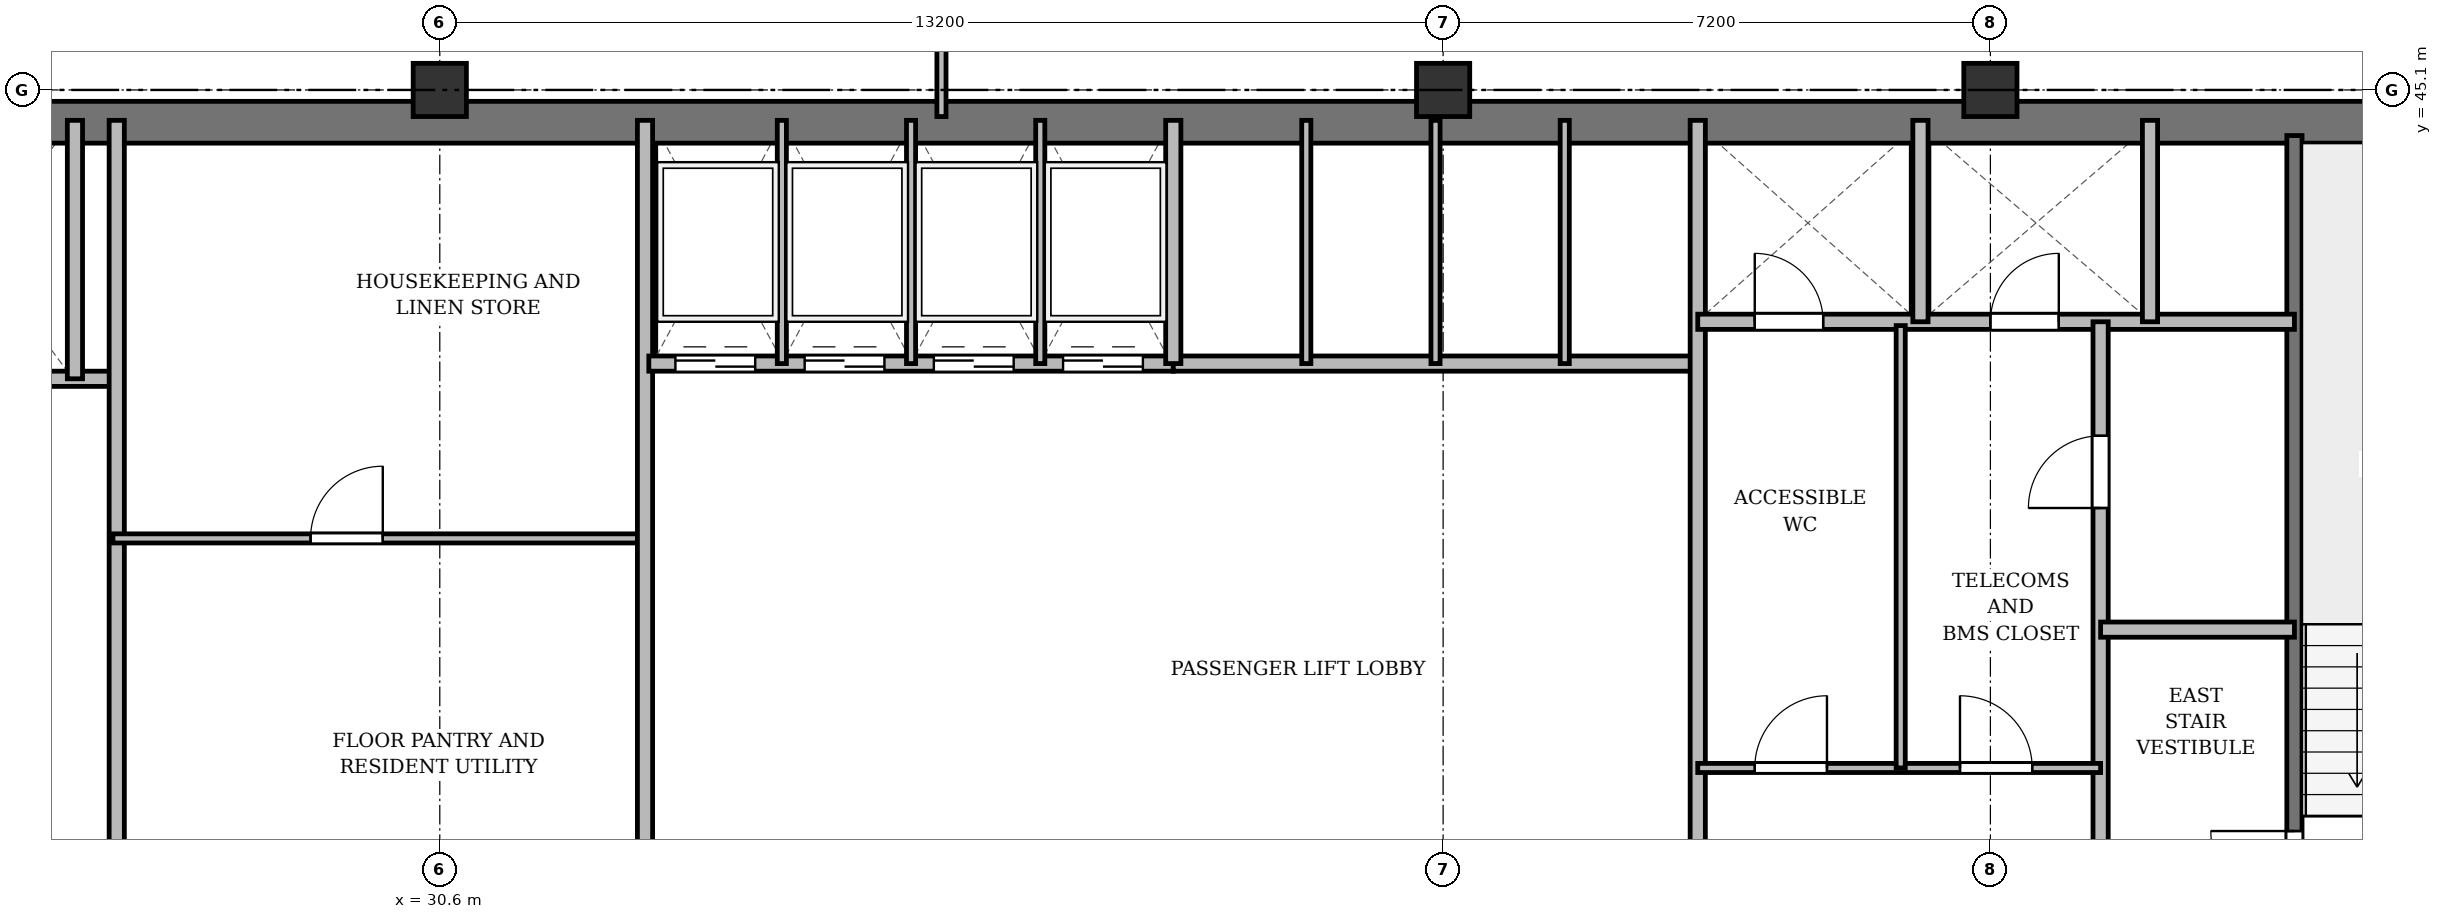
"""IFC4 building model, lengths in metres.
Left out: names, types, materials, properties, quantities, classifications, styles, units other than length and angle.
Written with IfcOpenShell. Run it as: python <this file> out.ifc"""

import sys

from ifc_helpers import new_model, si_unit, direction, frame, frame_2d, origin, origin_2d, place, context, subcontext, project, spatial, rectangle, extrude, source, transform, mapped, element, fill, save


model = new_model("IFC4")
c1 = context("Model", 3, precision=1e-05, world=origin(), true_north=direction((0.0, 1.0)))
c2 = subcontext(c1, "Body", "Model", "MODEL_VIEW")
j1 = project(units=[si_unit("LENGTHUNIT", "METRE"), si_unit("PLANEANGLEUNIT", "RADIAN")], contexts=[c1])
p1 = place(None, origin())
s1 = spatial("IfcSite", under=j1, at=p1, CompositionType="ELEMENT")
p2 = place(p1, origin())
s2 = spatial("IfcBuilding", under=s1, at=p2, CompositionType="ELEMENT")
p3 = place(p2, frame((0.0, 0.0, 208.5)))
s3 = spatial("IfcBuildingStorey", under=s2, at=p3, CompositionType="ELEMENT", Elevation=208.5)
m1 = source(origin(), c2, "Body", "SweptSolid", [
    extrude(rectangle(XDim=0.7, YDim=0.7, at=origin_2d()), origin(), (0.0, 0.0, 1.0), 3.6),
])
for number, where, z_axis, x_axis in (
    (1, (30.6, 45.1, 0.0), (0.0, 0.0, 1.0), (1.0, 0.0, 0.0)),
    (2, (43.8, 45.1, 0.0), (0.0, 0.0, 1.0), (1.0, 0.0, 0.0)),
    (3, (51.0, 45.1, 0.0), (0.0, 0.0, 1.0), (1.0, 0.0, 0.0)),
):
    element("IfcColumn", number, at=place(p3, frame(where, z_axis=z_axis, x_axis=x_axis)), inside=s3, PredefinedType="COLUMN", context=c2, shape_type="MappedRepresentation", body=[
        mapped(m1, transform((0.0, 0.0, 0.0), x_axis=(1.0, 0.0, 0.0), y_axis=(0.0, 1.0, 0.0), z_axis=(0.0, 0.0, 1.0), scale=1.0)),
    ])
p4 = place(p3, frame((15.65, 44.675, 0.0), z_axis=(0.0, 0.0, 1.0), x_axis=(1.0, 0.0, 0.0)))
e4 = element("IfcWall", 4, at=p4, inside=s3, PredefinedType="SHEAR", context=c2, shape_type="SweptSolid", body=[
    extrude(rectangle(XDim=43.1, YDim=0.55, at=frame_2d((21.55, 0.0))), origin(), (0.0, 0.0, 1.0), 3.36),
])
p5 = place(p3, frame((55.0, 33.4, 0.0), z_axis=(0.0, 0.0, 1.0), x_axis=(0.0, 1.0, 0.0)))
e5 = element("IfcWall", 5, at=p5, inside=s3, PredefinedType="SHEAR", context=c2, shape_type="SweptSolid", body=[
    extrude(rectangle(XDim=11.1, YDim=0.2, at=frame_2d((5.55, 0.0))), origin(), (0.0, 0.0, 1.0), 3.36),
])
p6 = place(p5, frame((0.85, 0.0, 0.0)))
e6 = element("IfcOpeningElement", 6, at=p6, cuts=e5, PredefinedType="OPENING", context=c2, shape_type="SweptSolid", body=[
    extrude(rectangle(XDim=1.1, YDim=2.15, at=frame_2d((0.55, 1.075))), frame((0.0, 0.11, 0.0), z_axis=(0.0, -1.0, 0.0), x_axis=(1.0, 0.0, 0.0)), (0.0, 0.0, 1.0), 0.22),
])
p7 = place(p3, frame((19.55, 41.3, 0.0), z_axis=(0.0, 0.0, 1.0), x_axis=(1.0, 0.0, 0.0)))
e7 = element("IfcWall", 7, at=p7, inside=s3, PredefinedType="SOLIDWALL", context=c2, shape_type="SweptSolid", body=[
    extrude(rectangle(XDim=6.75, YDim=0.2, at=frame_2d((3.375, 0.0))), origin(), (0.0, 0.0, 1.0), 3.36),
])
p8 = place(p7, frame((1.7, 0.0, 0.0)))
e8 = element("IfcOpeningElement", 8, at=p8, cuts=e7, PredefinedType="OPENING", context=c2, shape_type="SweptSolid", body=[
    extrude(rectangle(XDim=1.1, YDim=2.15, at=frame_2d((0.55, 1.075))), frame((0.0, 0.11, 0.0), z_axis=(0.0, -1.0, 0.0), x_axis=(1.0, 0.0, 0.0)), (0.0, 0.0, 1.0), 0.22),
])
p9 = place(p7, frame((4.4, 0.0, 0.0)))
e9 = element("IfcOpeningElement", 9, at=p9, cuts=e7, PredefinedType="OPENING", context=c2, shape_type="SweptSolid", body=[
    extrude(rectangle(XDim=1.1, YDim=2.15, at=frame_2d((0.55, 1.075))), frame((0.0, 0.11, 0.0), z_axis=(0.0, -1.0, 0.0), x_axis=(1.0, 0.0, 0.0)), (0.0, 0.0, 1.0), 0.22),
])
p10 = place(p3, frame((25.8, 41.3, 0.0), z_axis=(0.0, 0.0, 1.0), x_axis=(0.0, 1.0, 0.0)))
e10 = element("IfcWall", 10, at=p10, inside=s3, PredefinedType="SOLIDWALL", context=c2, shape_type="SweptSolid", body=[
    extrude(rectangle(XDim=3.4, YDim=0.2, at=frame_2d((1.7, 0.0))), origin(), (0.0, 0.0, 1.0), 3.36),
])
p11 = place(p3, frame((26.35, 33.4, 0.0), z_axis=(0.0, 0.0, 1.0), x_axis=(0.0, 1.0, 0.0)))
e11 = element("IfcWall", 11, at=p11, inside=s3, PredefinedType="SOLIDWALL", context=c2, shape_type="SweptSolid", body=[
    extrude(rectangle(XDim=11.3, YDim=0.2, at=frame_2d((5.65, 0.0))), origin(), (0.0, 0.0, 1.0), 2.91),
])
p12 = place(p3, frame((26.3, 39.2, 0.0), z_axis=(0.0, 0.0, 1.0), x_axis=(1.0, 0.0, 0.0)))
e12 = element("IfcWall", 12, at=p12, inside=s3, PredefinedType="PARTITIONING", context=c2, shape_type="SweptSolid", body=[
    extrude(rectangle(XDim=7.0, YDim=0.12, at=frame_2d((3.5, 0.0))), origin(), (0.0, 0.0, 1.0), 2.86),
])
p13 = place(p12, frame((2.6, 0.0, 0.0)))
e13 = element("IfcOpeningElement", 13, at=p13, cuts=e12, PredefinedType="OPENING", context=c2, shape_type="SweptSolid", body=[
    extrude(rectangle(XDim=0.95, YDim=2.15, at=frame_2d((0.475, 1.075))), frame((0.0, 0.07, 0.0), z_axis=(0.0, -1.0, 0.0), x_axis=(1.0, 0.0, 0.0)), (0.0, 0.0, 1.0), 0.14),
])
p14 = place(p3, frame((33.3, 33.4, 0.0), z_axis=(0.0, 0.0, 1.0), x_axis=(0.0, 1.0, 0.0)))
e14 = element("IfcWall", 14, at=p14, inside=s3, PredefinedType="SOLIDWALL", context=c2, shape_type="SweptSolid", body=[
    extrude(rectangle(XDim=11.3, YDim=0.2, at=frame_2d((5.65, 0.0))), origin(), (0.0, 0.0, 1.0), 2.91),
])
p15 = place(p3, frame((33.35, 41.5, 0.0), z_axis=(0.0, 0.0, 1.0), x_axis=(1.0, 0.0, 0.0)))
e15 = element("IfcWall", 15, at=p15, inside=s3, PredefinedType="SOLIDWALL", context=c2, shape_type="SweptSolid", body=[
    extrude(rectangle(XDim=6.9, YDim=0.2, at=frame_2d((3.45, 0.0))), origin(), (0.0, 0.0, 1.0), 3.36),
])
p16 = place(p15, frame((0.35, 0.0, 0.0)))
e16 = element("IfcOpeningElement", 16, at=p16, cuts=e15, PredefinedType="OPENING", context=c2, shape_type="SweptSolid", body=[
    extrude(rectangle(XDim=1.05, YDim=2.15, at=frame_2d((0.525, 1.075))), frame((0.0, 0.11, 0.0), z_axis=(0.0, -1.0, 0.0), x_axis=(1.0, 0.0, 0.0)), (0.0, 0.0, 1.0), 0.22),
])
p17 = place(p15, frame((2.05, 0.0, 0.0)))
e17 = element("IfcOpeningElement", 17, at=p17, cuts=e15, PredefinedType="OPENING", context=c2, shape_type="SweptSolid", body=[
    extrude(rectangle(XDim=1.05, YDim=2.15, at=frame_2d((0.525, 1.075))), frame((0.0, 0.11, 0.0), z_axis=(0.0, -1.0, 0.0), x_axis=(1.0, 0.0, 0.0)), (0.0, 0.0, 1.0), 0.22),
])
p18 = place(p15, frame((3.75, 0.0, 0.0)))
e18 = element("IfcOpeningElement", 18, at=p18, cuts=e15, PredefinedType="OPENING", context=c2, shape_type="SweptSolid", body=[
    extrude(rectangle(XDim=1.05, YDim=2.15, at=frame_2d((0.525, 1.075))), frame((0.0, 0.11, 0.0), z_axis=(0.0, -1.0, 0.0), x_axis=(1.0, 0.0, 0.0)), (0.0, 0.0, 1.0), 0.22),
])
p19 = place(p15, frame((5.45, 0.0, 0.0)))
e19 = element("IfcOpeningElement", 19, at=p19, cuts=e15, PredefinedType="OPENING", context=c2, shape_type="SweptSolid", body=[
    extrude(rectangle(XDim=1.05, YDim=2.15, at=frame_2d((0.525, 1.075))), frame((0.0, 0.11, 0.0), z_axis=(0.0, -1.0, 0.0), x_axis=(1.0, 0.0, 0.0)), (0.0, 0.0, 1.0), 0.22),
])
for number, where, z_axis, x_axis in (
    (20, (35.1, 41.5, 0.0), (0.0, 0.0, 1.0), (0.0, 1.0, 0.0)),
    (21, (36.8, 41.5, 0.0), (0.0, 0.0, 1.0), (0.0, 1.0, 0.0)),
    (22, (38.5, 41.5, 0.0), (0.0, 0.0, 1.0), (0.0, 1.0, 0.0)),
):
    element("IfcWall", number, at=place(p3, frame(where, z_axis=z_axis, x_axis=x_axis)), inside=s3, PredefinedType="PARTITIONING", context=c2, shape_type="SweptSolid", body=[
        extrude(rectangle(XDim=3.2, YDim=0.12, at=frame_2d((1.6, 0.0))), origin(), (0.0, 0.0, 1.0), 3.36),
    ])
p20 = place(p3, frame((40.25, 41.5, 0.0), z_axis=(0.0, 0.0, 1.0), x_axis=(1.0, 0.0, 0.0)))
e23 = element("IfcWall", 23, at=p20, inside=s3, PredefinedType="SOLIDWALL", context=c2, shape_type="SweptSolid", body=[
    extrude(rectangle(XDim=6.9, YDim=0.2, at=frame_2d((3.45, 0.0))), origin(), (0.0, 0.0, 1.0), 2.86),
])
p21 = place(p3, frame((40.25, 41.5, 0.0), z_axis=(0.0, 0.0, 1.0), x_axis=(0.0, 1.0, 0.0)))
e24 = element("IfcWall", 24, at=p21, inside=s3, PredefinedType="SOLIDWALL", context=c2, shape_type="SweptSolid", body=[
    extrude(rectangle(XDim=3.2, YDim=0.2, at=frame_2d((1.6, 0.0))), origin(), (0.0, 0.0, 1.0), 3.36),
])
p22 = place(p3, frame((42.0, 41.5, 0.0), z_axis=(0.0, 0.0, 1.0), x_axis=(0.0, 1.0, 0.0)))
e25 = element("IfcWall", 25, at=p22, inside=s3, PredefinedType="PARTITIONING", context=c2, shape_type="SweptSolid", body=[
    extrude(rectangle(XDim=3.2, YDim=0.12, at=frame_2d((1.6, 0.0))), origin(), (0.0, 0.0, 1.0), 3.36),
])
p23 = place(p3, frame((43.7, 41.5, 0.0), z_axis=(0.0, 0.0, 1.0), x_axis=(0.0, 1.0, 0.0)))
e26 = element("IfcWall", 26, at=p23, inside=s3, PredefinedType="PARTITIONING", context=c2, shape_type="SweptSolid", body=[
    extrude(rectangle(XDim=3.2, YDim=0.12, at=frame_2d((1.6, 0.0))), origin(), (0.0, 0.0, 1.0), 2.86),
])
p24 = place(p3, frame((45.4, 41.5, 0.0), z_axis=(0.0, 0.0, 1.0), x_axis=(0.0, 1.0, 0.0)))
e27 = element("IfcWall", 27, at=p24, inside=s3, PredefinedType="PARTITIONING", context=c2, shape_type="SweptSolid", body=[
    extrude(rectangle(XDim=3.2, YDim=0.12, at=frame_2d((1.6, 0.0))), origin(), (0.0, 0.0, 1.0), 3.36),
])
p25 = place(p3, frame((47.15, 33.4, 0.0), z_axis=(0.0, 0.0, 1.0), x_axis=(0.0, 1.0, 0.0)))
e28 = element("IfcWall", 28, at=p25, inside=s3, PredefinedType="SOLIDWALL", context=c2, shape_type="SweptSolid", body=[
    extrude(rectangle(XDim=11.3, YDim=0.2, at=frame_2d((5.65, 0.0))), origin(), (0.0, 0.0, 1.0), 2.91),
])
p26 = place(p3, frame((47.15, 42.05, 0.0), z_axis=(0.0, 0.0, 1.0), x_axis=(1.0, 0.0, 0.0)))
e29 = element("IfcWall", 29, at=p26, inside=s3, PredefinedType="SOLIDWALL", context=c2, shape_type="SweptSolid", body=[
    extrude(rectangle(XDim=7.85, YDim=0.2, at=frame_2d((3.925, 0.0))), origin(), (0.0, 0.0, 1.0), 2.86),
])
p27 = place(p26, frame((0.75, 0.0, 0.0)))
e30 = element("IfcOpeningElement", 30, at=p27, cuts=e29, PredefinedType="OPENING", context=c2, shape_type="SweptSolid", body=[
    extrude(rectangle(XDim=0.9, YDim=2.1, at=frame_2d((0.45, 1.05))), frame((0.0, 0.11, 0.0), z_axis=(0.0, -1.0, 0.0), x_axis=(1.0, 0.0, 0.0)), (0.0, 0.0, 1.0), 0.22),
])
p28 = place(p26, frame((3.85, 0.0, 0.0)))
e31 = element("IfcOpeningElement", 31, at=p28, cuts=e29, PredefinedType="OPENING", context=c2, shape_type="SweptSolid", body=[
    extrude(rectangle(XDim=0.9, YDim=2.1, at=frame_2d((0.45, 1.05))), frame((0.0, 0.11, 0.0), z_axis=(0.0, -1.0, 0.0), x_axis=(1.0, 0.0, 0.0)), (0.0, 0.0, 1.0), 0.22),
])
for number, where, z_axis, x_axis in (
    (32, (50.08, 42.05, 0.0), (0.0, 0.0, 1.0), (0.0, 1.0, 0.0)),
    (33, (53.1, 42.05, 0.0), (0.0, 0.0, 1.0), (0.0, 1.0, 0.0)),
):
    element("IfcWall", number, at=place(p3, frame(where, z_axis=z_axis, x_axis=x_axis)), inside=s3, PredefinedType="SOLIDWALL", context=c2, shape_type="SweptSolid", body=[
        extrude(rectangle(XDim=2.65, YDim=0.2, at=frame_2d((1.325, 0.0))), origin(), (0.0, 0.0, 1.0), 3.36),
    ])
p29 = place(p3, frame((52.45, 33.4, 0.0), z_axis=(0.0, 0.0, 1.0), x_axis=(0.0, 1.0, 0.0)))
e34 = element("IfcWall", 34, at=p29, inside=s3, PredefinedType="PARTITIONING", context=c2, shape_type="SweptSolid", body=[
    extrude(rectangle(XDim=8.65, YDim=0.2, at=frame_2d((4.325, 0.0))), origin(), (0.0, 0.0, 1.0), 2.91),
])
p30 = place(p29, frame((6.2, 0.0, 0.0)))
e35 = element("IfcOpeningElement", 35, at=p30, cuts=e34, PredefinedType="OPENING", context=c2, shape_type="SweptSolid", body=[
    extrude(rectangle(XDim=0.95, YDim=2.15, at=frame_2d((0.475, 1.075))), frame((0.0, 0.11, 0.0), z_axis=(0.0, -1.0, 0.0), x_axis=(1.0, 0.0, 0.0)), (0.0, 0.0, 1.0), 0.22),
])
p31 = place(p3, frame((52.45, 38.0, 0.0), z_axis=(0.0, 0.0, 1.0), x_axis=(1.0, 0.0, 0.0)))
e36 = element("IfcWall", 36, at=p31, inside=s3, PredefinedType="PARTITIONING", context=c2, shape_type="SweptSolid", body=[
    extrude(rectangle(XDim=2.55, YDim=0.2, at=frame_2d((1.275, 0.0))), origin(), (0.0, 0.0, 1.0), 3.36),
])
p32 = place(p3, frame((47.15, 36.18, 0.0), z_axis=(0.0, 0.0, 1.0), x_axis=(1.0, 0.0, 0.0)))
e37 = element("IfcWall", 37, at=p32, inside=s3, PredefinedType="PARTITIONING", context=c2, shape_type="SweptSolid", body=[
    extrude(rectangle(XDim=5.3, YDim=0.12, at=frame_2d((2.65, 0.0))), origin(), (0.0, 0.0, 1.0), 2.86),
])
p33 = place(p32, frame((0.75, 0.0, 0.0)))
e38 = element("IfcOpeningElement", 38, at=p33, cuts=e37, PredefinedType="OPENING", context=c2, shape_type="SweptSolid", body=[
    extrude(rectangle(XDim=0.95, YDim=2.15, at=frame_2d((0.475, 1.075))), frame((0.0, 0.07, 0.0), z_axis=(0.0, -1.0, 0.0), x_axis=(1.0, 0.0, 0.0)), (0.0, 0.0, 1.0), 0.14),
])
p34 = place(p32, frame((3.45, 0.0, 0.0)))
e39 = element("IfcOpeningElement", 39, at=p34, cuts=e37, PredefinedType="OPENING", context=c2, shape_type="SweptSolid", body=[
    extrude(rectangle(XDim=0.95, YDim=2.15, at=frame_2d((0.475, 1.075))), frame((0.0, 0.07, 0.0), z_axis=(0.0, -1.0, 0.0), x_axis=(1.0, 0.0, 0.0)), (0.0, 0.0, 1.0), 0.14),
])
p35 = place(p3, frame((49.82, 36.18, 0.0), z_axis=(0.0, 0.0, 1.0), x_axis=(0.0, 1.0, 0.0)))
e40 = element("IfcWall", 40, at=p35, inside=s3, PredefinedType="PARTITIONING", context=c2, shape_type="SweptSolid", body=[
    extrude(rectangle(XDim=5.82, YDim=0.12, at=frame_2d((2.91, 0.0))), origin(), (0.0, 0.0, 1.0), 3.36),
])
p36 = place(p3, frame((37.2, 44.75, 0.0), z_axis=(0.0, 0.0, 1.0), x_axis=(0.0, 1.0, 0.0)))
e41 = element("IfcWall", 41, at=p36, inside=s3, PredefinedType="PARTITIONING", context=c2, shape_type="SweptSolid", body=[
    extrude(rectangle(XDim=3.61, YDim=0.12, at=frame_2d((1.805, 0.0))), origin(), (0.0, 0.0, 1.0), 2.91),
])
p37 = place(p36, frame((1.1, 0.0, 0.0)))
e42 = element("IfcOpeningElement", 42, at=p37, cuts=e41, PredefinedType="OPENING", context=c2, shape_type="SweptSolid", body=[
    extrude(rectangle(XDim=0.95, YDim=2.15, at=frame_2d((0.475, 1.075))), frame((0.0, 0.07, 0.0), z_axis=(0.0, -1.0, 0.0), x_axis=(1.0, 0.0, 0.0)), (0.0, 0.0, 1.0), 0.14),
])
m2 = source(origin(), c2, "Body", "SweptSolid", [
    extrude(rectangle(XDim=1.1, YDim=2.15, at=frame_2d((0.55, 1.075))), frame((0.0, 0.025, 0.0), z_axis=(0.0, -1.0, 0.0), x_axis=(1.0, 0.0, 0.0)), (0.0, 0.0, 1.0), 0.05),
])
p38 = place(p6, origin())
e43 = element("IfcDoor", 43, at=p38, inside=s3, OperationType="SINGLE_SWING_RIGHT", PredefinedType="DOOR", context=c2, shape_type="MappedRepresentation", body=[
    mapped(m2, transform((0.0, 0.0, 0.0), x_axis=(1.0, 0.0, 0.0), y_axis=(0.0, 1.0, 0.0), z_axis=(0.0, 0.0, 1.0), scale=1.0)),
])
fill(e6, e43)
m3 = source(origin(), c2, "Body", "SweptSolid", [
    extrude(rectangle(XDim=0.95, YDim=2.15, at=frame_2d((0.475, 1.075))), frame((0.0, 0.025, 0.0), z_axis=(0.0, -1.0, 0.0), x_axis=(1.0, 0.0, 0.0)), (0.0, 0.0, 1.0), 0.05),
])
p39 = place(p13, origin())
e44 = element("IfcDoor", 44, at=p39, inside=s3, OperationType="SINGLE_SWING_RIGHT", PredefinedType="DOOR", context=c2, shape_type="MappedRepresentation", body=[
    mapped(m3, transform((0.0, 0.0, 0.0), x_axis=(1.0, 0.0, 0.0), y_axis=(0.0, 1.0, 0.0), z_axis=(0.0, 0.0, 1.0), scale=1.0)),
])
fill(e13, e44)
m4 = source(origin(), c2, "Body", "SweptSolid", [
    extrude(rectangle(XDim=1.05, YDim=2.15, at=frame_2d((0.525, 1.075))), frame((0.0, 0.025, 0.0), z_axis=(0.0, -1.0, 0.0), x_axis=(1.0, 0.0, 0.0)), (0.0, 0.0, 1.0), 0.05),
])
p40 = place(p16, origin())
e45 = element("IfcDoor", 45, at=p40, inside=s3, OperationType="DOUBLE_DOOR_SLIDING", PredefinedType="DOOR", context=c2, shape_type="MappedRepresentation", body=[
    mapped(m4, transform((0.0, 0.0, 0.0), x_axis=(1.0, 0.0, 0.0), y_axis=(0.0, 1.0, 0.0), z_axis=(0.0, 0.0, 1.0), scale=1.0)),
])
fill(e16, e45)
p41 = place(p17, origin())
e46 = element("IfcDoor", 46, at=p41, inside=s3, OperationType="DOUBLE_DOOR_SLIDING", PredefinedType="DOOR", context=c2, shape_type="MappedRepresentation", body=[
    mapped(m4, transform((0.0, 0.0, 0.0), x_axis=(1.0, 0.0, 0.0), y_axis=(0.0, 1.0, 0.0), z_axis=(0.0, 0.0, 1.0), scale=1.0)),
])
fill(e17, e46)
p42 = place(p18, origin())
e47 = element("IfcDoor", 47, at=p42, inside=s3, OperationType="DOUBLE_DOOR_SLIDING", PredefinedType="DOOR", context=c2, shape_type="MappedRepresentation", body=[
    mapped(m4, transform((0.0, 0.0, 0.0), x_axis=(1.0, 0.0, 0.0), y_axis=(0.0, 1.0, 0.0), z_axis=(0.0, 0.0, 1.0), scale=1.0)),
])
fill(e18, e47)
p43 = place(p19, origin())
e48 = element("IfcDoor", 48, at=p43, inside=s3, OperationType="DOUBLE_DOOR_SLIDING", PredefinedType="DOOR", context=c2, shape_type="MappedRepresentation", body=[
    mapped(m4, transform((0.0, 0.0, 0.0), x_axis=(1.0, 0.0, 0.0), y_axis=(0.0, 1.0, 0.0), z_axis=(0.0, 0.0, 1.0), scale=1.0)),
])
fill(e19, e48)
m5 = source(origin(), c2, "Body", "SweptSolid", [
    extrude(rectangle(XDim=0.9, YDim=2.1, at=frame_2d((0.45, 1.05))), frame((0.0, 0.025, 0.0), z_axis=(0.0, -1.0, 0.0), x_axis=(1.0, 0.0, 0.0)), (0.0, 0.0, 1.0), 0.05),
])
p44 = place(p27, origin())
e49 = element("IfcDoor", 49, at=p44, inside=s3, OperationType="SINGLE_SWING_LEFT", PredefinedType="DOOR", context=c2, shape_type="MappedRepresentation", body=[
    mapped(m5, transform((0.0, 0.0, 0.0), x_axis=(1.0, 0.0, 0.0), y_axis=(0.0, 1.0, 0.0), z_axis=(0.0, 0.0, 1.0), scale=1.0)),
])
fill(e30, e49)
p45 = place(p28, origin())
e50 = element("IfcDoor", 50, at=p45, inside=s3, OperationType="SINGLE_SWING_RIGHT", PredefinedType="DOOR", context=c2, shape_type="MappedRepresentation", body=[
    mapped(m5, transform((0.0, 0.0, 0.0), x_axis=(1.0, 0.0, 0.0), y_axis=(0.0, 1.0, 0.0), z_axis=(0.0, 0.0, 1.0), scale=1.0)),
])
fill(e31, e50)
p46 = place(p30, origin())
e51 = element("IfcDoor", 51, at=p46, inside=s3, OperationType="SINGLE_SWING_LEFT", PredefinedType="DOOR", context=c2, shape_type="MappedRepresentation", body=[
    mapped(m3, transform((0.0, 0.0, 0.0), x_axis=(1.0, 0.0, 0.0), y_axis=(0.0, 1.0, 0.0), z_axis=(0.0, 0.0, 1.0), scale=1.0)),
])
fill(e35, e51)
p47 = place(p33, origin())
e52 = element("IfcDoor", 52, at=p47, inside=s3, OperationType="SINGLE_SWING_RIGHT", PredefinedType="DOOR", context=c2, shape_type="MappedRepresentation", body=[
    mapped(m3, transform((0.0, 0.0, 0.0), x_axis=(1.0, 0.0, 0.0), y_axis=(0.0, 1.0, 0.0), z_axis=(0.0, 0.0, 1.0), scale=1.0)),
])
fill(e38, e52)
p48 = place(p34, origin())
e53 = element("IfcDoor", 53, at=p48, inside=s3, OperationType="SINGLE_SWING_LEFT", PredefinedType="DOOR", context=c2, shape_type="MappedRepresentation", body=[
    mapped(m3, transform((0.0, 0.0, 0.0), x_axis=(1.0, 0.0, 0.0), y_axis=(0.0, 1.0, 0.0), z_axis=(0.0, 0.0, 1.0), scale=1.0)),
])
fill(e39, e53)
save(model, sys.argv[1])
